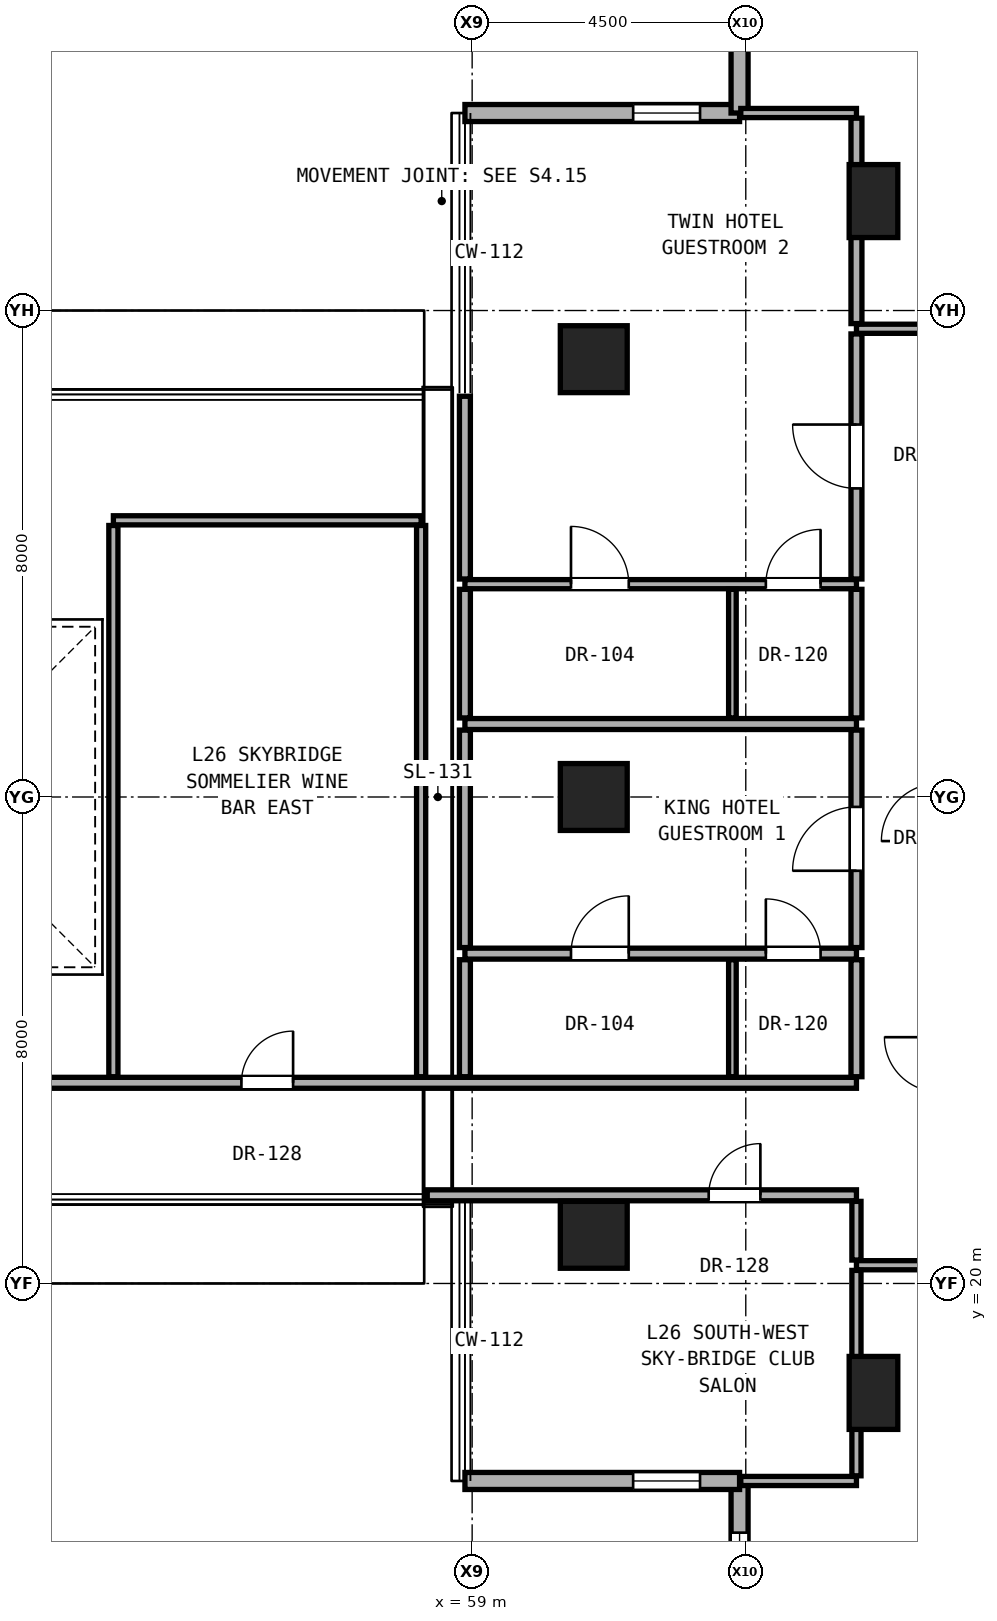
"""IFC4 building model, lengths in metres.
Left out: names, types, materials, properties, quantities, classifications, styles, units other than length and angle.
Written with IfcOpenShell. Run it as: python <this file> out.ifc"""

import sys

from ifc_helpers import new_model, si_unit, direction, frame, frame_2d, origin, origin_2d, place, context, subcontext, project, spatial, rectangle, hollow_rectangle, extrude, element, fill, save


model = new_model("IFC4")
c1 = context("Model", 3, precision=1e-05, world=origin(), true_north=direction((0.0, 1.0)))
c2 = subcontext(c1, "Body", "Model", "MODEL_VIEW")
j1 = project(units=[si_unit("LENGTHUNIT", "METRE"), si_unit("PLANEANGLEUNIT", "RADIAN")], contexts=[c1])
p1 = place(None, origin())
s1 = spatial("IfcSite", under=j1, at=p1, CompositionType="ELEMENT")
p2 = place(p1, origin())
s2 = spatial("IfcBuilding", under=s1, at=p2, CompositionType="ELEMENT")
p3 = place(p2, frame((0.0, 0.0, 95.0)))
s3 = spatial("IfcBuildingStorey", under=s2, at=p3, CompositionType="ELEMENT", Elevation=95.0)
for number, where, z_axis, x_axis in (
    (1, (61.0, 20.8, 0.0), (0.0, 0.0, 1.0), (1.0, 0.0, 0.0)),
    (2, (61.0, 28.0, 0.0), (0.0, 0.0, 1.0), (1.0, 0.0, 0.0)),
    (3, (61.0, 35.2, 0.0), (0.0, 0.0, 1.0), (1.0, 0.0, 0.0)),
):
    element("IfcColumn", number, at=place(p3, frame(where, z_axis=z_axis, x_axis=x_axis)), inside=s3, PredefinedType="COLUMN", context=c2, shape_type="SweptSolid", body=[
        extrude(hollow_rectangle(XDim=1.1, YDim=1.1, WallThickness=0.06, at=origin_2d()), origin(), (0.0, 0.0, 1.0), 3.3),
    ])
for number, where, z_axis, x_axis in (
    (4, (65.6, 18.2, 0.0), (0.0, 0.0, 1.0), (1.0, 0.0, 0.0)),
    (5, (65.6, 37.8, 0.0), (0.0, 0.0, 1.0), (1.0, 0.0, 0.0)),
):
    element("IfcColumn", number, at=place(p3, frame(where, z_axis=z_axis, x_axis=x_axis)), inside=s3, PredefinedType="PILASTER", context=c2, shape_type="SweptSolid", body=[
        extrude(rectangle(XDim=0.8, YDim=1.2, at=origin_2d()), origin(), (0.0, 0.0, 1.0), 3.3),
    ])
p4 = place(p3, frame((63.398, 16.752, 0.0), z_axis=(0.0, 0.0, 1.0), x_axis=(0.0, -1.0, 0.0)))
e6 = element("IfcWall", 6, at=p4, inside=s3, PredefinedType="SOLIDWALL", context=c2, shape_type="SweptSolid", body=[
    extrude(rectangle(XDim=4.516, YDim=0.28, at=frame_2d((2.258, 0.0))), origin(), (0.0, 0.0, 1.0), 3.06),
])
p5 = place(p4, frame((0.85, 0.0, 0.81)))
e7 = element("IfcOpeningElement", 7, at=p5, cuts=e6, PredefinedType="OPENING", context=c2, shape_type="SweptSolid", body=[
    extrude(rectangle(XDim=1.2, YDim=2.1, at=frame_2d((0.6, 1.05))), frame((0.0, 0.15, 0.0), z_axis=(0.0, -1.0, 0.0), x_axis=(1.0, 0.0, 0.0)), (0.0, 0.0, 1.0), 0.3),
])
p6 = place(p3, frame((58.882, 16.752, 0.0), z_axis=(0.0, 0.0, 1.0), x_axis=(1.0, 0.0, 0.0)))
e8 = element("IfcWall", 8, at=p6, inside=s3, PredefinedType="SOLIDWALL", context=c2, shape_type="SweptSolid", body=[
    extrude(rectangle(XDim=4.516, YDim=0.28, at=frame_2d((2.258, 0.0))), origin(), (0.0, 0.0, 1.0), 3.06),
])
p7 = place(p6, frame((2.766, 0.0, 0.85)))
e9 = element("IfcOpeningElement", 9, at=p7, cuts=e8, PredefinedType="OPENING", context=c2, shape_type="SweptSolid", body=[
    extrude(rectangle(XDim=1.1, YDim=2.0, at=frame_2d((0.55, 1.0))), frame((0.0, 0.15, 0.0), z_axis=(0.0, -1.0, 0.0), x_axis=(1.0, 0.0, 0.0)), (0.0, 0.0, 1.0), 0.3),
])
p8 = place(p3, frame((63.398, 39.248, 0.0), z_axis=(0.0, 0.0, 1.0), x_axis=(-1.0, 0.0, 0.0)))
e10 = element("IfcWall", 10, at=p8, inside=s3, PredefinedType="SOLIDWALL", context=c2, shape_type="SweptSolid", body=[
    extrude(rectangle(XDim=4.516, YDim=0.28, at=frame_2d((2.258, 0.0))), origin(), (0.0, 0.0, 1.0), 3.06),
])
p9 = place(p8, frame((0.65, 0.0, 0.85)))
e11 = element("IfcOpeningElement", 11, at=p9, cuts=e10, PredefinedType="OPENING", context=c2, shape_type="SweptSolid", body=[
    extrude(rectangle(XDim=1.1, YDim=2.0, at=frame_2d((0.55, 1.0))), frame((0.0, 0.15, 0.0), z_axis=(0.0, -1.0, 0.0), x_axis=(1.0, 0.0, 0.0)), (0.0, 0.0, 1.0), 0.3),
])
p10 = place(p3, frame((63.398, 43.764, 0.0), z_axis=(0.0, 0.0, 1.0), x_axis=(0.0, -1.0, 0.0)))
e12 = element("IfcWall", 12, at=p10, inside=s3, PredefinedType="SOLIDWALL", context=c2, shape_type="SweptSolid", body=[
    extrude(rectangle(XDim=4.516, YDim=0.28, at=frame_2d((2.258, 0.0))), origin(), (0.0, 0.0, 1.0), 3.06),
])
p11 = place(p3, frame((63.418, 16.752, 0.0), z_axis=(0.0, 0.0, 1.0), x_axis=(1.0, 0.0, 0.0)))
e13 = element("IfcWall", 13, at=p11, inside=s3, PredefinedType="PARTITIONING", context=c2, shape_type="SweptSolid", body=[
    extrude(rectangle(XDim=1.902, YDim=0.15, at=frame_2d((0.951, 0.0))), origin(), (0.0, 0.0, 1.0), 3.08),
])
p12 = place(p3, frame((65.32, 20.3, 0.0), z_axis=(0.0, 0.0, 1.0), x_axis=(1.0, 0.0, 0.0)))
e14 = element("IfcWall", 14, at=p12, inside=s3, PredefinedType="PARTITIONING", context=c2, shape_type="SweptSolid", body=[
    extrude(rectangle(XDim=1.36, YDim=0.15, at=frame_2d((0.68, 0.0))), origin(), (0.0, 0.0, 1.0), 3.08),
])
p13 = place(p3, frame((58.261, 21.45, 0.0), z_axis=(0.0, 0.0, 1.0), x_axis=(1.0, 0.0, 0.0)))
e15 = element("IfcWall", 15, at=p13, inside=s3, PredefinedType="PARTITIONING", context=c2, shape_type="SweptSolid", body=[
    extrude(rectangle(XDim=7.059, YDim=0.18, at=frame_2d((3.529, 0.0))), origin(), (0.0, 0.0, 1.0), 2.105),
])
p14 = place(p13, frame((4.628, 0.0, 0.0)))
e16 = element("IfcOpeningElement", 16, at=p14, cuts=e15, PredefinedType="OPENING", context=c2, shape_type="SweptSolid", body=[
    extrude(rectangle(XDim=0.85, YDim=2.01, at=frame_2d((0.425, 1.005))), frame((0.0, 0.1, 0.0), z_axis=(0.0, -1.0, 0.0), x_axis=(1.0, 0.0, 0.0)), (0.0, 0.0, 1.0), 0.2),
])
p15 = place(p3, frame((32.1, 23.3, 0.0), z_axis=(0.0, 0.0, 1.0), x_axis=(1.0, 0.0, 0.0)))
e17 = element("IfcWall", 17, at=p15, inside=s3, PredefinedType="PARTITIONING", context=c2, shape_type="SweptSolid", body=[
    extrude(rectangle(XDim=33.22, YDim=0.18, at=frame_2d((16.61, 0.0))), origin(), (0.0, 0.0, 1.0), 2.145),
])
p16 = place(p15, frame((11.705, 0.0, 0.0)))
e18 = element("IfcOpeningElement", 18, at=p16, cuts=e17, PredefinedType="OPENING", context=c2, shape_type="SweptSolid", body=[
    extrude(rectangle(XDim=0.85, YDim=2.01, at=frame_2d((0.425, 1.005))), frame((0.0, 0.1, 0.0), z_axis=(0.0, -1.0, 0.0), x_axis=(1.0, 0.0, 0.0)), (0.0, 0.0, 1.0), 0.2),
])
p17 = place(p15, frame((23.105, 0.0, 0.0)))
e19 = element("IfcOpeningElement", 19, at=p17, cuts=e17, PredefinedType="OPENING", context=c2, shape_type="SweptSolid", body=[
    extrude(rectangle(XDim=0.85, YDim=2.01, at=frame_2d((0.425, 1.005))), frame((0.0, 0.1, 0.0), z_axis=(0.0, -1.0, 0.0), x_axis=(1.0, 0.0, 0.0)), (0.0, 0.0, 1.0), 0.2),
])
p18 = place(p3, frame((58.881, 25.424, 0.0), z_axis=(0.0, 0.0, 1.0), x_axis=(1.0, 0.0, 0.0)))
e20 = element("IfcWall", 20, at=p18, inside=s3, PredefinedType="PARTITIONING", context=c2, shape_type="SweptSolid", body=[
    extrude(rectangle(XDim=6.439, YDim=0.18, at=frame_2d((3.219, 0.0))), origin(), (0.0, 0.0, 1.0), 2.216),
])
p19 = place(p18, frame((1.744, 0.0, 0.0)))
e21 = element("IfcOpeningElement", 21, at=p19, cuts=e20, PredefinedType="OPENING", context=c2, shape_type="SweptSolid", body=[
    extrude(rectangle(XDim=0.95, YDim=2.15, at=frame_2d((0.475, 1.075))), frame((0.0, 0.1, 0.0), z_axis=(0.0, -1.0, 0.0), x_axis=(1.0, 0.0, 0.0)), (0.0, 0.0, 1.0), 0.2),
])
p20 = place(p18, frame((4.949, 0.0, 0.0)))
e22 = element("IfcOpeningElement", 22, at=p20, cuts=e20, PredefinedType="OPENING", context=c2, shape_type="SweptSolid", body=[
    extrude(rectangle(XDim=0.9, YDim=2.1, at=frame_2d((0.45, 1.05))), frame((0.0, 0.1, 0.0), z_axis=(0.0, -1.0, 0.0), x_axis=(1.0, 0.0, 0.0)), (0.0, 0.0, 1.0), 0.2),
])
p21 = place(p3, frame((58.881, 29.2, 0.0), z_axis=(0.0, 0.0, 1.0), x_axis=(1.0, 0.0, 0.0)))
e23 = element("IfcWall", 23, at=p21, inside=s3, PredefinedType="PARTITIONING", context=c2, shape_type="SweptSolid", body=[
    extrude(rectangle(XDim=6.439, YDim=0.18, at=frame_2d((3.219, 0.0))), origin(), (0.0, 0.0, 1.0), 2.216),
])
p22 = place(p3, frame((58.881, 31.5, 0.0), z_axis=(0.0, 0.0, 1.0), x_axis=(1.0, 0.0, 0.0)))
e24 = element("IfcWall", 24, at=p22, inside=s3, PredefinedType="PARTITIONING", context=c2, shape_type="SweptSolid", body=[
    extrude(rectangle(XDim=6.439, YDim=0.15, at=frame_2d((3.219, 0.0))), origin(), (0.0, 0.0, 1.0), 2.216),
])
p23 = place(p22, frame((1.744, 0.0, 0.0)))
e25 = element("IfcOpeningElement", 25, at=p23, cuts=e24, PredefinedType="OPENING", context=c2, shape_type="SweptSolid", body=[
    extrude(rectangle(XDim=0.95, YDim=2.15, at=frame_2d((0.475, 1.075))), frame((0.0, 0.085, 0.0), z_axis=(0.0, -1.0, 0.0), x_axis=(1.0, 0.0, 0.0)), (0.0, 0.0, 1.0), 0.17),
])
p24 = place(p22, frame((4.949, 0.0, 0.0)))
e26 = element("IfcOpeningElement", 26, at=p24, cuts=e24, PredefinedType="OPENING", context=c2, shape_type="SweptSolid", body=[
    extrude(rectangle(XDim=0.9, YDim=2.1, at=frame_2d((0.45, 1.05))), frame((0.0, 0.085, 0.0), z_axis=(0.0, -1.0, 0.0), x_axis=(1.0, 0.0, 0.0)), (0.0, 0.0, 1.0), 0.17),
])
p25 = place(p3, frame((53.1, 32.55, 0.0), z_axis=(0.0, 0.0, 1.0), x_axis=(1.0, 0.0, 0.0)))
e27 = element("IfcWall", 27, at=p25, inside=s3, PredefinedType="PARTITIONING", context=c2, shape_type="SweptSolid", body=[
    extrude(rectangle(XDim=5.061, YDim=0.15, at=frame_2d((2.53, 0.0))), origin(), (0.0, 0.0, 1.0), 2.416),
])
p26 = place(p3, frame((65.32, 35.7, 0.0), z_axis=(0.0, 0.0, 1.0), x_axis=(1.0, 0.0, 0.0)))
e28 = element("IfcWall", 28, at=p26, inside=s3, PredefinedType="PARTITIONING", context=c2, shape_type="SweptSolid", body=[
    extrude(rectangle(XDim=1.36, YDim=0.15, at=frame_2d((0.68, 0.0))), origin(), (0.0, 0.0, 1.0), 3.08),
])
p27 = place(p3, frame((63.418, 39.248, 0.0), z_axis=(0.0, 0.0, 1.0), x_axis=(1.0, 0.0, 0.0)))
e29 = element("IfcWall", 29, at=p27, inside=s3, PredefinedType="PARTITIONING", context=c2, shape_type="SweptSolid", body=[
    extrude(rectangle(XDim=1.902, YDim=0.15, at=frame_2d((0.951, 0.0))), origin(), (0.0, 0.0, 1.0), 3.08),
])
for number, where, z_axis, x_axis in (
    (30, (53.1, 23.4, 0.0), (0.0, 0.0, 1.0), (0.0, 1.0, 0.0)),
    (31, (58.161, 23.4, 0.0), (0.0, 0.0, 1.0), (0.0, 1.0, 0.0)),
):
    element("IfcWall", number, at=place(p3, frame(where, z_axis=z_axis, x_axis=x_axis)), inside=s3, PredefinedType="PARTITIONING", context=c2, shape_type="SweptSolid", body=[
        extrude(rectangle(XDim=9.065, YDim=0.15, at=frame_2d((4.533, 0.0))), origin(), (0.0, 0.0, 1.0), 2.105),
    ])
p28 = place(p3, frame((58.881, 23.4, 0.0), z_axis=(0.0, 0.0, 1.0), x_axis=(0.0, 1.0, 0.0)))
e32 = element("IfcWall", 32, at=p28, inside=s3, PredefinedType="PARTITIONING", context=c2, shape_type="SweptSolid", body=[
    extrude(rectangle(XDim=1.924, YDim=0.18, at=frame_2d((0.962, 0.0))), origin(), (0.0, 0.0, 1.0), 3.08),
])
p29 = place(p3, frame((58.881, 25.524, 0.0), z_axis=(0.0, 0.0, 1.0), x_axis=(0.0, 1.0, 0.0)))
e33 = element("IfcWall", 33, at=p29, inside=s3, PredefinedType="PARTITIONING", context=c2, shape_type="SweptSolid", body=[
    extrude(rectangle(XDim=3.576, YDim=0.18, at=frame_2d((1.788, 0.0))), origin(), (0.0, 0.0, 1.0), 2.105),
])
p30 = place(p3, frame((58.881, 29.3, 0.0), z_axis=(0.0, 0.0, 1.0), x_axis=(0.0, 1.0, 0.0)))
e34 = element("IfcWall", 34, at=p30, inside=s3, PredefinedType="PARTITIONING", context=c2, shape_type="SweptSolid", body=[
    extrude(rectangle(XDim=2.115, YDim=0.18, at=frame_2d((1.058, 0.0))), origin(), (0.0, 0.0, 1.0), 3.08),
])
p31 = place(p3, frame((58.881, 31.585, 0.0), z_axis=(0.0, 0.0, 1.0), x_axis=(0.0, 1.0, 0.0)))
e35 = element("IfcWall", 35, at=p31, inside=s3, PredefinedType="PARTITIONING", context=c2, shape_type="SweptSolid", body=[
    extrude(rectangle(XDim=3.005, YDim=0.18, at=frame_2d((1.502, 0.0))), origin(), (0.0, 0.0, 1.0), 2.105),
])
p32 = place(p3, frame((63.28, 23.4, 0.0), z_axis=(0.0, 0.0, 1.0), x_axis=(0.0, 1.0, 0.0)))
e36 = element("IfcWall", 36, at=p32, inside=s3, PredefinedType="PARTITIONING", context=c2, shape_type="SweptSolid", body=[
    extrude(rectangle(XDim=1.924, YDim=0.125, at=frame_2d((0.962, 0.0))), origin(), (0.0, 0.0, 1.0), 3.08),
])
p33 = place(p3, frame((63.28, 29.3, 0.0), z_axis=(0.0, 0.0, 1.0), x_axis=(0.0, 1.0, 0.0)))
e37 = element("IfcWall", 37, at=p33, inside=s3, PredefinedType="PARTITIONING", context=c2, shape_type="SweptSolid", body=[
    extrude(rectangle(XDim=2.115, YDim=0.125, at=frame_2d((1.058, 0.0))), origin(), (0.0, 0.0, 1.0), 3.08),
])
p34 = place(p3, frame((65.32, 16.837, 0.0), z_axis=(0.0, 0.0, 1.0), x_axis=(0.0, 1.0, 0.0)))
e38 = element("IfcWall", 38, at=p34, inside=s3, PredefinedType="PARTITIONING", context=c2, shape_type="SweptSolid", body=[
    extrude(rectangle(XDim=3.378, YDim=0.15, at=frame_2d((1.689, 0.0))), origin(), (0.0, 0.0, 1.0), 2.456),
])
p35 = place(p3, frame((65.32, 20.385, 0.0), z_axis=(0.0, 0.0, 1.0), x_axis=(0.0, 1.0, 0.0)))
e39 = element("IfcWall", 39, at=p35, inside=s3, PredefinedType="PARTITIONING", context=c2, shape_type="SweptSolid", body=[
    extrude(rectangle(XDim=0.965, YDim=0.15, at=frame_2d((0.482, 0.0))), origin(), (0.0, 0.0, 1.0), 2.472),
])
p36 = place(p3, frame((65.32, 23.4, 0.0), z_axis=(0.0, 0.0, 1.0), x_axis=(0.0, 1.0, 0.0)))
e40 = element("IfcWall", 40, at=p36, inside=s3, PredefinedType="PARTITIONING", context=c2, shape_type="SweptSolid", body=[
    extrude(rectangle(XDim=1.924, YDim=0.18, at=frame_2d((0.962, 0.0))), origin(), (0.0, 0.0, 1.0), 3.08),
])
p37 = place(p3, frame((65.32, 25.524, 0.0), z_axis=(0.0, 0.0, 1.0), x_axis=(0.0, 1.0, 0.0)))
e41 = element("IfcWall", 41, at=p37, inside=s3, PredefinedType="PARTITIONING", context=c2, shape_type="SweptSolid", body=[
    extrude(rectangle(XDim=3.576, YDim=0.18, at=frame_2d((1.788, 0.0))), origin(), (0.0, 0.0, 1.0), 2.299),
])
p38 = place(p37, frame((1.263, 0.0, 0.0)))
e42 = element("IfcOpeningElement", 42, at=p38, cuts=e41, PredefinedType="OPENING", context=c2, shape_type="SweptSolid", body=[
    extrude(rectangle(XDim=1.05, YDim=2.2, at=frame_2d((0.525, 1.1))), frame((0.0, 0.1, 0.0), z_axis=(0.0, -1.0, 0.0), x_axis=(1.0, 0.0, 0.0)), (0.0, 0.0, 1.0), 0.2),
])
p39 = place(p3, frame((65.32, 29.3, 0.0), z_axis=(0.0, 0.0, 1.0), x_axis=(0.0, 1.0, 0.0)))
e43 = element("IfcWall", 43, at=p39, inside=s3, PredefinedType="PARTITIONING", context=c2, shape_type="SweptSolid", body=[
    extrude(rectangle(XDim=2.115, YDim=0.18, at=frame_2d((1.058, 0.0))), origin(), (0.0, 0.0, 1.0), 3.08),
])
p40 = place(p3, frame((65.32, 31.585, 0.0), z_axis=(0.0, 0.0, 1.0), x_axis=(0.0, 1.0, 0.0)))
e44 = element("IfcWall", 44, at=p40, inside=s3, PredefinedType="PARTITIONING", context=c2, shape_type="SweptSolid", body=[
    extrude(rectangle(XDim=4.03, YDim=0.18, at=frame_2d((2.015, 0.0))), origin(), (0.0, 0.0, 1.0), 2.472),
])
p41 = place(p40, frame((1.49, 0.0, 0.0)))
e45 = element("IfcOpeningElement", 45, at=p41, cuts=e44, PredefinedType="OPENING", context=c2, shape_type="SweptSolid", body=[
    extrude(rectangle(XDim=1.05, YDim=2.2, at=frame_2d((0.525, 1.1))), frame((0.0, 0.1, 0.0), z_axis=(0.0, -1.0, 0.0), x_axis=(1.0, 0.0, 0.0)), (0.0, 0.0, 1.0), 0.2),
])
p42 = place(p3, frame((65.32, 35.785, 0.0), z_axis=(0.0, 0.0, 1.0), x_axis=(0.0, 1.0, 0.0)))
e46 = element("IfcWall", 46, at=p42, inside=s3, PredefinedType="PARTITIONING", context=c2, shape_type="SweptSolid", body=[
    extrude(rectangle(XDim=3.378, YDim=0.18, at=frame_2d((1.689, 0.0))), origin(), (0.0, 0.0, 1.0), 2.456),
])
p43 = place(p5, origin())
e47 = element("IfcWindow", 47, at=p43, inside=s3, PartitioningType="SINGLE_PANEL", PredefinedType="WINDOW", context=c2, shape_type="SweptSolid", body=[
    extrude(rectangle(XDim=1.2, YDim=2.1, at=frame_2d((0.6, 1.05))), frame((0.0, 0.03, 0.0), z_axis=(0.0, -1.0, 0.0), x_axis=(1.0, 0.0, 0.0)), (0.0, 0.0, 1.0), 0.06),
])
fill(e7, e47)
p44 = place(p7, origin())
e48 = element("IfcWindow", 48, at=p44, inside=s3, PartitioningType="SINGLE_PANEL", PredefinedType="WINDOW", context=c2, shape_type="SweptSolid", body=[
    extrude(rectangle(XDim=1.1, YDim=2.0, at=frame_2d((0.55, 1.0))), frame((0.0, 0.03, 0.0), z_axis=(0.0, -1.0, 0.0), x_axis=(1.0, 0.0, 0.0)), (0.0, 0.0, 1.0), 0.06),
])
fill(e9, e48)
p45 = place(p9, origin())
e49 = element("IfcWindow", 49, at=p45, inside=s3, PartitioningType="SINGLE_PANEL", PredefinedType="WINDOW", context=c2, shape_type="SweptSolid", body=[
    extrude(rectangle(XDim=1.1, YDim=2.0, at=frame_2d((0.55, 1.0))), frame((0.0, 0.03, 0.0), z_axis=(0.0, -1.0, 0.0), x_axis=(1.0, 0.0, 0.0)), (0.0, 0.0, 1.0), 0.06),
])
fill(e11, e49)
p46 = place(p38, origin())
e50 = element("IfcDoor", 50, at=p46, inside=s3, OperationType="SINGLE_SWING_LEFT", PredefinedType="DOOR", context=c2, shape_type="SweptSolid", body=[
    extrude(rectangle(XDim=1.05, YDim=2.2, at=frame_2d((0.525, 1.1))), frame((0.0, 0.025, 0.0), z_axis=(0.0, -1.0, 0.0), x_axis=(1.0, 0.0, 0.0)), (0.0, 0.0, 1.0), 0.05),
])
fill(e42, e50)
p47 = place(p19, origin())
e51 = element("IfcDoor", 51, at=p47, inside=s3, OperationType="SINGLE_SWING_RIGHT", PredefinedType="DOOR", context=c2, shape_type="SweptSolid", body=[
    extrude(rectangle(XDim=0.95, YDim=2.15, at=frame_2d((0.475, 1.075))), frame((0.0, 0.025, 0.0), z_axis=(0.0, -1.0, 0.0), x_axis=(1.0, 0.0, 0.0)), (0.0, 0.0, 1.0), 0.05),
])
fill(e21, e51)
p48 = place(p20, origin())
e52 = element("IfcDoor", 52, at=p48, inside=s3, OperationType="SINGLE_SWING_LEFT", PredefinedType="DOOR", context=c2, shape_type="SweptSolid", body=[
    extrude(rectangle(XDim=0.9, YDim=2.1, at=frame_2d((0.45, 1.05))), frame((0.0, 0.025, 0.0), z_axis=(0.0, -1.0, 0.0), x_axis=(1.0, 0.0, 0.0)), (0.0, 0.0, 1.0), 0.05),
])
fill(e22, e52)
p49 = place(p41, origin())
e53 = element("IfcDoor", 53, at=p49, inside=s3, OperationType="SINGLE_SWING_RIGHT", PredefinedType="DOOR", context=c2, shape_type="SweptSolid", body=[
    extrude(rectangle(XDim=1.05, YDim=2.2, at=frame_2d((0.525, 1.1))), frame((0.0, 0.025, 0.0), z_axis=(0.0, -1.0, 0.0), x_axis=(1.0, 0.0, 0.0)), (0.0, 0.0, 1.0), 0.05),
])
fill(e45, e53)
p50 = place(p23, origin())
e54 = element("IfcDoor", 54, at=p50, inside=s3, OperationType="SINGLE_SWING_LEFT", PredefinedType="DOOR", context=c2, shape_type="SweptSolid", body=[
    extrude(rectangle(XDim=0.95, YDim=2.15, at=frame_2d((0.475, 1.075))), frame((0.0, 0.025, 0.0), z_axis=(0.0, -1.0, 0.0), x_axis=(1.0, 0.0, 0.0)), (0.0, 0.0, 1.0), 0.05),
])
fill(e25, e54)
p51 = place(p24, origin())
e55 = element("IfcDoor", 55, at=p51, inside=s3, OperationType="SINGLE_SWING_RIGHT", PredefinedType="DOOR", context=c2, shape_type="SweptSolid", body=[
    extrude(rectangle(XDim=0.9, YDim=2.1, at=frame_2d((0.45, 1.05))), frame((0.0, 0.025, 0.0), z_axis=(0.0, -1.0, 0.0), x_axis=(1.0, 0.0, 0.0)), (0.0, 0.0, 1.0), 0.05),
])
fill(e26, e55)
p52 = place(p14, origin())
e56 = element("IfcDoor", 56, at=p52, inside=s3, OperationType="SINGLE_SWING_RIGHT", PredefinedType="DOOR", context=c2, shape_type="SweptSolid", body=[
    extrude(rectangle(XDim=0.85, YDim=2.01, at=frame_2d((0.425, 1.005))), frame((0.0, 0.025, 0.0), z_axis=(0.0, -1.0, 0.0), x_axis=(1.0, 0.0, 0.0)), (0.0, 0.0, 1.0), 0.05),
])
fill(e16, e56)
p53 = place(p17, origin())
e57 = element("IfcDoor", 57, at=p53, inside=s3, OperationType="SINGLE_SWING_RIGHT", PredefinedType="DOOR", context=c2, shape_type="SweptSolid", body=[
    extrude(rectangle(XDim=0.85, YDim=2.01, at=frame_2d((0.425, 1.005))), frame((0.0, 0.025, 0.0), z_axis=(0.0, -1.0, 0.0), x_axis=(1.0, 0.0, 0.0)), (0.0, 0.0, 1.0), 0.05),
])
fill(e19, e57)
save(model, sys.argv[1])
